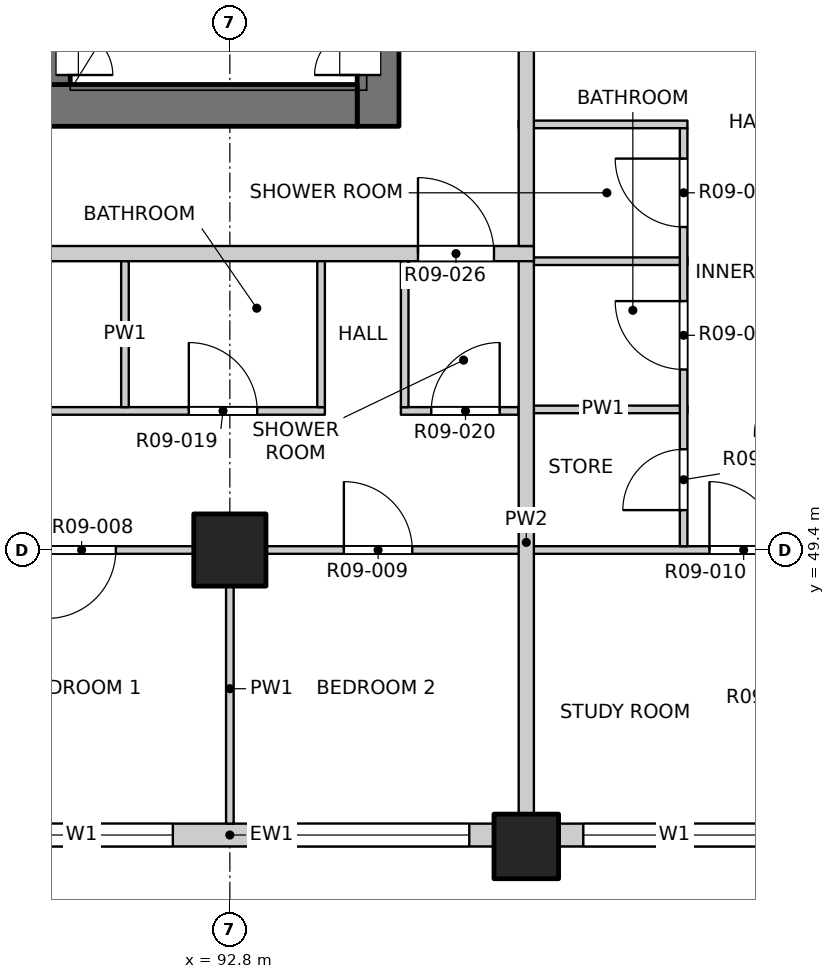
"""IFC4 building model, lengths in metres.
Left out: names, types, materials, properties, quantities, classifications, styles, units other than length and angle.
Written with IfcOpenShell. Run it as: python <this file> out.ifc"""

import sys

from ifc_helpers import new_model, si_unit, direction, frame, frame_2d, origin, origin_2d, place, context, subcontext, project, spatial, rectangle, extrude, element, fill, save


model = new_model("IFC4")
c1 = context("Model", 3, precision=1e-05, world=origin(), true_north=direction((0.0, 1.0)))
c2 = subcontext(c1, "Body", "Model", "MODEL_VIEW")
j1 = project(units=[si_unit("LENGTHUNIT", "METRE"), si_unit("PLANEANGLEUNIT", "RADIAN")], contexts=[c1])
p1 = place(None, origin())
s1 = spatial("IfcSite", under=j1, at=p1, CompositionType="ELEMENT")
p2 = place(p1, origin())
s2 = spatial("IfcBuilding", under=s1, at=p2, CompositionType="ELEMENT")
p3 = place(p2, frame((0.0, 0.0, 113.5)))
s3 = spatial("IfcBuildingStorey", under=s2, at=p3, CompositionType="ELEMENT", Elevation=113.5)
p4 = place(p3, frame((96.7, 45.5, -0.25), z_axis=(0.0, 0.0, 1.0), x_axis=(1.0, 0.0, 0.0)))
e1 = element("IfcColumn", 1, at=p4, inside=s3, PredefinedType="COLUMN", context=c2, shape_type="SweptSolid", body=[
    extrude(rectangle(XDim=0.85, YDim=0.85, at=origin_2d()), origin(), (0.0, 0.0, 1.0), 3.35),
])
p5 = place(p3, frame((92.8, 49.4, -0.25), z_axis=(0.0, 0.0, 1.0), x_axis=(1.0, 0.0, 0.0)))
e2 = element("IfcColumn", 2, at=p5, inside=s3, PredefinedType="COLUMN", context=c2, shape_type="SweptSolid", body=[
    extrude(rectangle(XDim=0.95, YDim=0.95, at=origin_2d()), origin(), (0.0, 0.0, 1.0), 3.35),
])
p6 = place(p3, frame((94.75, 54.975, -0.25), z_axis=(0.0, 0.0, 1.0), x_axis=(0.0, 1.0, 0.0)))
e3 = element("IfcWall", 3, at=p6, inside=s3, PredefinedType="SOLIDWALL", context=c2, shape_type="SweptSolid", body=[
    extrude(rectangle(XDim=6.975, YDim=0.55, at=frame_2d((3.487, 0.0))), origin(), (0.0, 0.0, 1.0), 3.35),
])
p7 = place(p6, frame((0.675, 0.0, 0.25)))
e4 = element("IfcOpeningElement", 4, at=p7, cuts=e3, PredefinedType="OPENING", context=c2, shape_type="SweptSolid", body=[
    extrude(rectangle(XDim=1.2, YDim=2.1, at=frame_2d((0.6, 1.05))), frame((0.0, 0.285, 0.0), z_axis=(0.0, -1.0, 0.0), x_axis=(1.0, 0.0, 0.0)), (0.0, 0.0, 1.0), 0.57),
])
p8 = place(p3, frame((75.525, 55.25, -0.25), z_axis=(0.0, 0.0, 1.0), x_axis=(1.0, 0.0, 0.0)))
e5 = element("IfcWall", 5, at=p8, inside=s3, PredefinedType="SOLIDWALL", context=c2, shape_type="SweptSolid", body=[
    extrude(rectangle(XDim=18.95, YDim=0.55, at=frame_2d((9.475, 0.0))), origin(), (0.0, 0.0, 1.0), 3.35),
])
p9 = place(p8, frame((8.725, 0.0, 0.25)))
e6 = element("IfcOpeningElement", 6, at=p9, cuts=e5, PredefinedType="OPENING", context=c2, shape_type="SweptSolid", body=[
    extrude(rectangle(XDim=1.5, YDim=2.1, at=frame_2d((0.75, 1.05))), frame((0.0, 0.285, 0.0), z_axis=(0.0, -1.0, 0.0), x_axis=(1.0, 0.0, 0.0)), (0.0, 0.0, 1.0), 0.57),
])
p10 = place(p3, frame((90.55, 55.525, -0.25), z_axis=(0.0, 0.0, 1.0), x_axis=(0.0, 1.0, 0.0)))
e7 = element("IfcWall", 7, at=p10, inside=s3, PredefinedType="SOLIDWALL", context=c2, shape_type="SweptSolid", body=[
    extrude(rectangle(XDim=6.425, YDim=0.3, at=frame_2d((3.212, 0.0))), origin(), (0.0, 0.0, 1.0), 3.35),
])
p11 = place(p10, frame((0.125, 0.0, 0.25)))
e8 = element("IfcOpeningElement", 8, at=p11, cuts=e7, PredefinedType="OPENING", context=c2, shape_type="SweptSolid", body=[
    extrude(rectangle(XDim=1.2, YDim=2.1, at=frame_2d((0.6, 1.05))), frame((0.0, 0.16, 0.0), z_axis=(0.0, -1.0, 0.0), x_axis=(1.0, 0.0, 0.0)), (0.0, 0.0, 1.0), 0.32),
])
p12 = place(p3, frame((89.325, 45.65, 0.0), z_axis=(0.0, 0.0, 1.0), x_axis=(1.0, 0.0, 0.0)))
e9 = element("IfcWall", 9, at=p12, inside=s3, PredefinedType="SOLIDWALL", context=c2, shape_type="SweptSolid", body=[
    extrude(rectangle(XDim=6.95, YDim=0.3, at=frame_2d((3.475, 0.0))), origin(), (0.0, 0.0, 1.0), 3.1),
])
p13 = place(p12, frame((0.325, 0.0, 0.9)))
e10 = element("IfcOpeningElement", 10, at=p13, cuts=e9, PredefinedType="OPENING", context=c2, shape_type="SweptSolid", body=[
    extrude(rectangle(XDim=2.4, YDim=1.8, at=frame_2d((1.2, 0.9))), frame((0.0, 0.16, 0.0), z_axis=(0.0, -1.0, 0.0), x_axis=(1.0, 0.0, 0.0)), (0.0, 0.0, 1.0), 0.32),
])
p14 = place(p12, frame((4.225, 0.0, 0.9)))
e11 = element("IfcOpeningElement", 11, at=p14, cuts=e9, PredefinedType="OPENING", context=c2, shape_type="SweptSolid", body=[
    extrude(rectangle(XDim=2.4, YDim=1.8, at=frame_2d((1.2, 0.9))), frame((0.0, 0.16, 0.0), z_axis=(0.0, -1.0, 0.0), x_axis=(1.0, 0.0, 0.0)), (0.0, 0.0, 1.0), 0.32),
])
p15 = place(p3, frame((97.125, 45.65, 0.0), z_axis=(0.0, 0.0, 1.0), x_axis=(1.0, 0.0, 0.0)))
e12 = element("IfcWall", 12, at=p15, inside=s3, PredefinedType="SOLIDWALL", context=c2, shape_type="SweptSolid", body=[
    extrude(rectangle(XDim=3.475, YDim=0.3, at=frame_2d((1.738, 0.0))), origin(), (0.0, 0.0, 1.0), 3.1),
])
p16 = place(p15, frame((0.325, 0.0, 0.9)))
e13 = element("IfcOpeningElement", 13, at=p16, cuts=e12, PredefinedType="OPENING", context=c2, shape_type="SweptSolid", body=[
    extrude(rectangle(XDim=2.4, YDim=1.8, at=frame_2d((1.2, 0.9))), frame((0.0, 0.16, 0.0), z_axis=(0.0, -1.0, 0.0), x_axis=(1.0, 0.0, 0.0)), (0.0, 0.0, 1.0), 0.32),
])
p17 = place(p3, frame((65.8, 49.4, 0.0), z_axis=(0.0, 0.0, 1.0), x_axis=(1.0, 0.0, 0.0)))
e14 = element("IfcWall", 14, at=p17, inside=s3, PredefinedType="PARTITIONING", context=c2, shape_type="SweptSolid", body=[
    extrude(rectangle(XDim=38.4, YDim=0.1, at=frame_2d((19.2, 0.0))), origin(), (0.0, 0.0, 1.0), 3.1),
])
p18 = place(p17, frame((4.19, 0.0, 0.0)))
e15 = element("IfcOpeningElement", 15, at=p18, cuts=e14, PredefinedType="OPENING", context=c2, shape_type="SweptSolid", body=[
    extrude(rectangle(XDim=0.9, YDim=2.1, at=frame_2d((0.45, 1.05))), frame((0.0, 0.06, 0.0), z_axis=(0.0, -1.0, 0.0), x_axis=(1.0, 0.0, 0.0)), (0.0, 0.0, 1.0), 0.12),
])
p19 = place(p17, frame((9.0, 0.0, 0.0)))
e16 = element("IfcOpeningElement", 16, at=p19, cuts=e14, PredefinedType="OPENING", context=c2, shape_type="SweptSolid", body=[
    extrude(rectangle(XDim=0.9, YDim=2.1, at=frame_2d((0.45, 1.05))), frame((0.0, 0.06, 0.0), z_axis=(0.0, -1.0, 0.0), x_axis=(1.0, 0.0, 0.0)), (0.0, 0.0, 1.0), 0.12),
])
p20 = place(p17, frame((12.9, 0.0, 0.0)))
e17 = element("IfcOpeningElement", 17, at=p20, cuts=e14, PredefinedType="OPENING", context=c2, shape_type="SweptSolid", body=[
    extrude(rectangle(XDim=0.9, YDim=2.1, at=frame_2d((0.45, 1.05))), frame((0.0, 0.06, 0.0), z_axis=(0.0, -1.0, 0.0), x_axis=(1.0, 0.0, 0.0)), (0.0, 0.0, 1.0), 0.12),
])
p21 = place(p17, frame((16.8, 0.0, 0.0)))
e18 = element("IfcOpeningElement", 18, at=p21, cuts=e14, PredefinedType="OPENING", context=c2, shape_type="SweptSolid", body=[
    extrude(rectangle(XDim=0.9, YDim=2.1, at=frame_2d((0.45, 1.05))), frame((0.0, 0.06, 0.0), z_axis=(0.0, -1.0, 0.0), x_axis=(1.0, 0.0, 0.0)), (0.0, 0.0, 1.0), 0.12),
])
p22 = place(p17, frame((20.7, 0.0, 0.0)))
e19 = element("IfcOpeningElement", 19, at=p22, cuts=e14, PredefinedType="OPENING", context=c2, shape_type="SweptSolid", body=[
    extrude(rectangle(XDim=0.9, YDim=2.1, at=frame_2d((0.45, 1.05))), frame((0.0, 0.06, 0.0), z_axis=(0.0, -1.0, 0.0), x_axis=(1.0, 0.0, 0.0)), (0.0, 0.0, 1.0), 0.12),
])
p23 = place(p17, frame((24.6, 0.0, 0.0)))
e20 = element("IfcOpeningElement", 20, at=p23, cuts=e14, PredefinedType="OPENING", context=c2, shape_type="SweptSolid", body=[
    extrude(rectangle(XDim=0.9, YDim=2.1, at=frame_2d((0.45, 1.05))), frame((0.0, 0.06, 0.0), z_axis=(0.0, -1.0, 0.0), x_axis=(1.0, 0.0, 0.0)), (0.0, 0.0, 1.0), 0.12),
])
p24 = place(p17, frame((28.5, 0.0, 0.0)))
e21 = element("IfcOpeningElement", 21, at=p24, cuts=e14, PredefinedType="OPENING", context=c2, shape_type="SweptSolid", body=[
    extrude(rectangle(XDim=0.9, YDim=2.1, at=frame_2d((0.45, 1.05))), frame((0.0, 0.06, 0.0), z_axis=(0.0, -1.0, 0.0), x_axis=(1.0, 0.0, 0.0)), (0.0, 0.0, 1.0), 0.12),
])
p25 = place(p17, frame((33.31, 0.0, 0.0)))
e22 = element("IfcOpeningElement", 22, at=p25, cuts=e14, PredefinedType="OPENING", context=c2, shape_type="SweptSolid", body=[
    extrude(rectangle(XDim=0.9, YDim=2.1, at=frame_2d((0.45, 1.05))), frame((0.0, 0.06, 0.0), z_axis=(0.0, -1.0, 0.0), x_axis=(1.0, 0.0, 0.0)), (0.0, 0.0, 1.0), 0.12),
])
p26 = place(p3, frame((83.35, 51.23, 0.0), z_axis=(0.0, 0.0, 1.0), x_axis=(1.0, 0.0, 0.0)))
e23 = element("IfcWall", 23, at=p26, inside=s3, PredefinedType="PARTITIONING", context=c2, shape_type="SweptSolid", body=[
    extrude(rectangle(XDim=10.7, YDim=0.1, at=frame_2d((5.35, 0.0))), origin(), (0.0, 0.0, 1.0), 3.1),
])
p27 = place(p26, frame((0.4, 0.0, 0.0)))
e24 = element("IfcOpeningElement", 24, at=p27, cuts=e23, PredefinedType="OPENING", context=c2, shape_type="SweptSolid", body=[
    extrude(rectangle(XDim=0.9, YDim=2.1, at=frame_2d((0.45, 1.05))), frame((0.0, 0.06, 0.0), z_axis=(0.0, -1.0, 0.0), x_axis=(1.0, 0.0, 0.0)), (0.0, 0.0, 1.0), 0.12),
])
p28 = place(p26, frame((2.7, 0.0, 0.0)))
e25 = element("IfcOpeningElement", 25, at=p28, cuts=e23, PredefinedType="OPENING", context=c2, shape_type="SweptSolid", body=[
    extrude(rectangle(XDim=0.8, YDim=2.1, at=frame_2d((0.4, 1.05))), frame((0.0, 0.06, 0.0), z_axis=(0.0, -1.0, 0.0), x_axis=(1.0, 0.0, 0.0)), (0.0, 0.0, 1.0), 0.12),
])
p29 = place(p26, frame((5.86, 0.0, 0.0)))
e26 = element("IfcOpeningElement", 26, at=p29, cuts=e23, PredefinedType="OPENING", context=c2, shape_type="SweptSolid", body=[
    extrude(rectangle(XDim=0.9, YDim=2.1, at=frame_2d((0.45, 1.05))), frame((0.0, 0.06, 0.0), z_axis=(0.0, -1.0, 0.0), x_axis=(1.0, 0.0, 0.0)), (0.0, 0.0, 1.0), 0.12),
])
p30 = place(p26, frame((8.91, 0.0, 0.0)))
e27 = element("IfcOpeningElement", 27, at=p30, cuts=e23, PredefinedType="OPENING", context=c2, shape_type="SweptSolid", body=[
    extrude(rectangle(XDim=0.9, YDim=2.1, at=frame_2d((0.45, 1.05))), frame((0.0, 0.06, 0.0), z_axis=(0.0, -1.0, 0.0), x_axis=(1.0, 0.0, 0.0)), (0.0, 0.0, 1.0), 0.12),
])
p31 = place(p3, frame((95.05, 51.23, 0.0), z_axis=(0.0, 0.0, 1.0), x_axis=(1.0, 0.0, 0.0)))
e28 = element("IfcWall", 28, at=p31, inside=s3, PredefinedType="PARTITIONING", context=c2, shape_type="SweptSolid", body=[
    extrude(rectangle(XDim=1.55, YDim=0.1, at=frame_2d((0.775, 0.0))), origin(), (0.0, 0.0, 1.0), 3.1),
])
p32 = place(p31, frame((0.4, 0.0, 0.0)))
e29 = element("IfcOpeningElement", 29, at=p32, cuts=e28, PredefinedType="OPENING", context=c2, shape_type="SweptSolid", body=[
    extrude(rectangle(XDim=0.9, YDim=2.1, at=frame_2d((0.45, 1.05))), frame((0.0, 0.06, 0.0), z_axis=(0.0, -1.0, 0.0), x_axis=(1.0, 0.0, 0.0)), (0.0, 0.0, 1.0), 0.12),
])
p33 = place(p3, frame((96.6, 51.25, 0.0), z_axis=(0.0, 0.0, 1.0), x_axis=(1.0, 0.0, 0.0)))
e30 = element("IfcWall", 30, at=p33, inside=s3, PredefinedType="PARTITIONING", context=c2, shape_type="SweptSolid", body=[
    extrude(rectangle(XDim=2.22, YDim=0.1, at=frame_2d((1.11, 0.0))), origin(), (0.0, 0.0, 1.0), 3.1),
])
p34 = place(p3, frame((96.8, 53.2, 0.0), z_axis=(0.0, 0.0, 1.0), x_axis=(1.0, 0.0, 0.0)))
e31 = element("IfcWall", 31, at=p34, inside=s3, PredefinedType="PARTITIONING", context=c2, shape_type="SweptSolid", body=[
    extrude(rectangle(XDim=2.02, YDim=0.1, at=frame_2d((1.01, 0.0))), origin(), (0.0, 0.0, 1.0), 3.1),
])
p35 = place(p3, frame((73.2, 53.3, 0.0), z_axis=(0.0, 0.0, 1.0), x_axis=(1.0, 0.0, 0.0)))
e32 = element("IfcWall", 32, at=p35, inside=s3, PredefinedType="PARTITIONING", context=c2, shape_type="SweptSolid", body=[
    extrude(rectangle(XDim=23.6, YDim=0.2, at=frame_2d((11.8, 0.0))), origin(), (0.0, 0.0, 1.0), 3.1),
])
p36 = place(p35, frame((10.375, 0.0, 0.0)))
e33 = element("IfcOpeningElement", 33, at=p36, cuts=e32, PredefinedType="OPENING", context=c2, shape_type="SweptSolid", body=[
    extrude(rectangle(XDim=1.0, YDim=2.1, at=frame_2d((0.5, 1.05))), frame((0.0, 0.11, 0.0), z_axis=(0.0, -1.0, 0.0), x_axis=(1.0, 0.0, 0.0)), (0.0, 0.0, 1.0), 0.22),
])
p37 = place(p35, frame((22.075, 0.0, 0.0)))
e34 = element("IfcOpeningElement", 34, at=p37, cuts=e32, PredefinedType="OPENING", context=c2, shape_type="SweptSolid", body=[
    extrude(rectangle(XDim=1.0, YDim=2.1, at=frame_2d((0.5, 1.05))), frame((0.0, 0.11, 0.0), z_axis=(0.0, -1.0, 0.0), x_axis=(1.0, 0.0, 0.0)), (0.0, 0.0, 1.0), 0.22),
])
p38 = place(p3, frame((96.6, 55.0, 0.0), z_axis=(0.0, 0.0, 1.0), x_axis=(1.0, 0.0, 0.0)))
e35 = element("IfcWall", 35, at=p38, inside=s3, PredefinedType="PARTITIONING", context=c2, shape_type="SweptSolid", body=[
    extrude(rectangle(XDim=2.22, YDim=0.1, at=frame_2d((1.11, 0.0))), origin(), (0.0, 0.0, 1.0), 3.1),
])
p39 = place(p3, frame((91.42, 51.28, 0.0), z_axis=(0.0, 0.0, 1.0), x_axis=(0.0, 1.0, 0.0)))
e36 = element("IfcWall", 36, at=p39, inside=s3, PredefinedType="PARTITIONING", context=c2, shape_type="SweptSolid", body=[
    extrude(rectangle(XDim=1.92, YDim=0.1, at=frame_2d((0.96, 0.0))), origin(), (0.0, 0.0, 1.0), 3.1),
])
p40 = place(p3, frame((92.8, 45.8, 0.0), z_axis=(0.0, 0.0, 1.0), x_axis=(0.0, 1.0, 0.0)))
e37 = element("IfcWall", 37, at=p40, inside=s3, PredefinedType="PARTITIONING", context=c2, shape_type="SweptSolid", body=[
    extrude(rectangle(XDim=3.55, YDim=0.1, at=frame_2d((1.775, 0.0))), origin(), (0.0, 0.0, 1.0), 3.1),
])
for number, where, z_axis, x_axis in (
    (38, (94.0, 51.28, 0.0), (0.0, 0.0, 1.0), (0.0, 1.0, 0.0)),
    (39, (95.1, 51.28, 0.0), (0.0, 0.0, 1.0), (0.0, 1.0, 0.0)),
):
    element("IfcWall", number, at=place(p3, frame(where, z_axis=z_axis, x_axis=x_axis)), inside=s3, PredefinedType="PARTITIONING", context=c2, shape_type="SweptSolid", body=[
        extrude(rectangle(XDim=1.92, YDim=0.1, at=frame_2d((0.96, 0.0))), origin(), (0.0, 0.0, 1.0), 3.1),
    ])
p41 = place(p3, frame((96.7, 45.8, 0.0), z_axis=(0.0, 0.0, 1.0), x_axis=(0.0, 1.0, 0.0)))
e40 = element("IfcWall", 40, at=p41, inside=s3, PredefinedType="PARTITIONING", context=c2, shape_type="SweptSolid", body=[
    extrude(rectangle(XDim=7.4, YDim=0.2, at=frame_2d((3.7, 0.0))), origin(), (0.0, 0.0, 1.0), 3.1),
])
p42 = place(p3, frame((96.7, 53.4, 0.0), z_axis=(0.0, 0.0, 1.0), x_axis=(0.0, 1.0, 0.0)))
e41 = element("IfcWall", 41, at=p42, inside=s3, PredefinedType="PARTITIONING", context=c2, shape_type="SweptSolid", body=[
    extrude(rectangle(XDim=30.8, YDim=0.2, at=frame_2d((15.4, 0.0))), origin(), (0.0, 0.0, 1.0), 3.1),
])
p43 = place(p42, frame((2.875, 0.0, 0.0)))
e42 = element("IfcOpeningElement", 42, at=p43, cuts=e41, PredefinedType="OPENING", context=c2, shape_type="SweptSolid", body=[
    extrude(rectangle(XDim=1.0, YDim=2.1, at=frame_2d((0.5, 1.05))), frame((0.0, 0.11, 0.0), z_axis=(0.0, -1.0, 0.0), x_axis=(1.0, 0.0, 0.0)), (0.0, 0.0, 1.0), 0.22),
])
p44 = place(p42, frame((14.775, 0.0, 0.0)))
e43 = element("IfcOpeningElement", 43, at=p44, cuts=e41, PredefinedType="OPENING", context=c2, shape_type="SweptSolid", body=[
    extrude(rectangle(XDim=1.0, YDim=2.1, at=frame_2d((0.5, 1.05))), frame((0.0, 0.11, 0.0), z_axis=(0.0, -1.0, 0.0), x_axis=(1.0, 0.0, 0.0)), (0.0, 0.0, 1.0), 0.22),
])
p45 = place(p42, frame((20.025, 0.0, 0.0)))
e44 = element("IfcOpeningElement", 44, at=p45, cuts=e41, PredefinedType="OPENING", context=c2, shape_type="SweptSolid", body=[
    extrude(rectangle(XDim=1.0, YDim=2.1, at=frame_2d((0.5, 1.05))), frame((0.0, 0.11, 0.0), z_axis=(0.0, -1.0, 0.0), x_axis=(1.0, 0.0, 0.0)), (0.0, 0.0, 1.0), 0.22),
])
p46 = place(p3, frame((98.77, 49.45, 0.0), z_axis=(0.0, 0.0, 1.0), x_axis=(0.0, 1.0, 0.0)))
e45 = element("IfcWall", 45, at=p46, inside=s3, PredefinedType="PARTITIONING", context=c2, shape_type="SweptSolid", body=[
    extrude(rectangle(XDim=5.5, YDim=0.1, at=frame_2d((2.75, 0.0))), origin(), (0.0, 0.0, 1.0), 3.1),
])
p47 = place(p46, frame((0.475, 0.0, 0.0)))
e46 = element("IfcOpeningElement", 46, at=p47, cuts=e45, PredefinedType="OPENING", context=c2, shape_type="SweptSolid", body=[
    extrude(rectangle(XDim=0.8, YDim=2.1, at=frame_2d((0.4, 1.05))), frame((0.0, 0.06, 0.0), z_axis=(0.0, -1.0, 0.0), x_axis=(1.0, 0.0, 0.0)), (0.0, 0.0, 1.0), 0.12),
])
p48 = place(p46, frame((2.325, 0.0, 0.0)))
e47 = element("IfcOpeningElement", 47, at=p48, cuts=e45, PredefinedType="OPENING", context=c2, shape_type="SweptSolid", body=[
    extrude(rectangle(XDim=0.9, YDim=2.1, at=frame_2d((0.45, 1.05))), frame((0.0, 0.06, 0.0), z_axis=(0.0, -1.0, 0.0), x_axis=(1.0, 0.0, 0.0)), (0.0, 0.0, 1.0), 0.12),
])
p49 = place(p46, frame((4.2, 0.0, 0.0)))
e48 = element("IfcOpeningElement", 48, at=p49, cuts=e45, PredefinedType="OPENING", context=c2, shape_type="SweptSolid", body=[
    extrude(rectangle(XDim=0.9, YDim=2.1, at=frame_2d((0.45, 1.05))), frame((0.0, 0.06, 0.0), z_axis=(0.0, -1.0, 0.0), x_axis=(1.0, 0.0, 0.0)), (0.0, 0.0, 1.0), 0.12),
])
p50 = place(p13, origin())
e49 = element("IfcWindow", 49, at=p50, inside=s3, PartitioningType="DOUBLE_PANEL_VERTICAL", PredefinedType="WINDOW", context=c2, shape_type="SweptSolid", body=[
    extrude(rectangle(XDim=2.4, YDim=1.8, at=frame_2d((1.2, 0.9))), frame((0.0, 0.03, 0.0), z_axis=(0.0, -1.0, 0.0), x_axis=(1.0, 0.0, 0.0)), (0.0, 0.0, 1.0), 0.06),
])
fill(e10, e49)
p51 = place(p14, origin())
e50 = element("IfcWindow", 50, at=p51, inside=s3, PartitioningType="DOUBLE_PANEL_VERTICAL", PredefinedType="WINDOW", context=c2, shape_type="SweptSolid", body=[
    extrude(rectangle(XDim=2.4, YDim=1.8, at=frame_2d((1.2, 0.9))), frame((0.0, 0.03, 0.0), z_axis=(0.0, -1.0, 0.0), x_axis=(1.0, 0.0, 0.0)), (0.0, 0.0, 1.0), 0.06),
])
fill(e11, e50)
p52 = place(p16, origin())
e51 = element("IfcWindow", 51, at=p52, inside=s3, PartitioningType="DOUBLE_PANEL_VERTICAL", PredefinedType="WINDOW", context=c2, shape_type="SweptSolid", body=[
    extrude(rectangle(XDim=2.4, YDim=1.8, at=frame_2d((1.2, 0.9))), frame((0.0, 0.03, 0.0), z_axis=(0.0, -1.0, 0.0), x_axis=(1.0, 0.0, 0.0)), (0.0, 0.0, 1.0), 0.06),
])
fill(e13, e51)
p53 = place(p23, origin())
e52 = element("IfcDoor", 52, at=p53, inside=s3, OperationType="SINGLE_SWING_RIGHT", PredefinedType="DOOR", context=c2, shape_type="SweptSolid", body=[
    extrude(rectangle(XDim=0.9, YDim=2.1, at=frame_2d((0.45, 1.05))), frame((0.0, 0.025, 0.0), z_axis=(0.0, -1.0, 0.0), x_axis=(1.0, 0.0, 0.0)), (0.0, 0.0, 1.0), 0.05),
])
fill(e20, e52)
p54 = place(p24, origin())
e53 = element("IfcDoor", 53, at=p54, inside=s3, OperationType="SINGLE_SWING_LEFT", PredefinedType="DOOR", context=c2, shape_type="SweptSolid", body=[
    extrude(rectangle(XDim=0.9, YDim=2.1, at=frame_2d((0.45, 1.05))), frame((0.0, 0.025, 0.0), z_axis=(0.0, -1.0, 0.0), x_axis=(1.0, 0.0, 0.0)), (0.0, 0.0, 1.0), 0.05),
])
fill(e21, e53)
p55 = place(p25, origin())
e54 = element("IfcDoor", 54, at=p55, inside=s3, OperationType="SINGLE_SWING_LEFT", PredefinedType="DOOR", context=c2, shape_type="SweptSolid", body=[
    extrude(rectangle(XDim=0.9, YDim=2.1, at=frame_2d((0.45, 1.05))), frame((0.0, 0.025, 0.0), z_axis=(0.0, -1.0, 0.0), x_axis=(1.0, 0.0, 0.0)), (0.0, 0.0, 1.0), 0.05),
])
fill(e22, e54)
p56 = place(p47, origin())
e55 = element("IfcDoor", 55, at=p56, inside=s3, OperationType="SINGLE_SWING_LEFT", PredefinedType="DOOR", context=c2, shape_type="SweptSolid", body=[
    extrude(rectangle(XDim=0.8, YDim=2.1, at=frame_2d((0.4, 1.05))), frame((0.0, 0.025, 0.0), z_axis=(0.0, -1.0, 0.0), x_axis=(1.0, 0.0, 0.0)), (0.0, 0.0, 1.0), 0.05),
])
fill(e46, e55)
p57 = place(p30, origin())
e56 = element("IfcDoor", 56, at=p57, inside=s3, OperationType="SINGLE_SWING_LEFT", PredefinedType="DOOR", context=c2, shape_type="SweptSolid", body=[
    extrude(rectangle(XDim=0.9, YDim=2.1, at=frame_2d((0.45, 1.05))), frame((0.0, 0.025, 0.0), z_axis=(0.0, -1.0, 0.0), x_axis=(1.0, 0.0, 0.0)), (0.0, 0.0, 1.0), 0.05),
])
fill(e27, e56)
p58 = place(p32, origin())
e57 = element("IfcDoor", 57, at=p58, inside=s3, OperationType="SINGLE_SWING_RIGHT", PredefinedType="DOOR", context=c2, shape_type="SweptSolid", body=[
    extrude(rectangle(XDim=0.9, YDim=2.1, at=frame_2d((0.45, 1.05))), frame((0.0, 0.025, 0.0), z_axis=(0.0, -1.0, 0.0), x_axis=(1.0, 0.0, 0.0)), (0.0, 0.0, 1.0), 0.05),
])
fill(e29, e57)
p59 = place(p48, origin())
e58 = element("IfcDoor", 58, at=p59, inside=s3, OperationType="SINGLE_SWING_RIGHT", PredefinedType="DOOR", context=c2, shape_type="SweptSolid", body=[
    extrude(rectangle(XDim=0.9, YDim=2.1, at=frame_2d((0.45, 1.05))), frame((0.0, 0.025, 0.0), z_axis=(0.0, -1.0, 0.0), x_axis=(1.0, 0.0, 0.0)), (0.0, 0.0, 1.0), 0.05),
])
fill(e47, e58)
p60 = place(p37, origin())
e59 = element("IfcDoor", 59, at=p60, inside=s3, OperationType="SINGLE_SWING_LEFT", PredefinedType="DOOR", context=c2, shape_type="SweptSolid", body=[
    extrude(rectangle(XDim=1.0, YDim=2.1, at=frame_2d((0.5, 1.05))), frame((0.0, 0.025, 0.0), z_axis=(0.0, -1.0, 0.0), x_axis=(1.0, 0.0, 0.0)), (0.0, 0.0, 1.0), 0.05),
])
fill(e34, e59)
p61 = place(p49, origin())
e60 = element("IfcDoor", 60, at=p61, inside=s3, OperationType="SINGLE_SWING_RIGHT", PredefinedType="DOOR", context=c2, shape_type="SweptSolid", body=[
    extrude(rectangle(XDim=0.9, YDim=2.1, at=frame_2d((0.45, 1.05))), frame((0.0, 0.025, 0.0), z_axis=(0.0, -1.0, 0.0), x_axis=(1.0, 0.0, 0.0)), (0.0, 0.0, 1.0), 0.05),
])
fill(e48, e60)
p62 = place(p11, origin())
e61 = element("IfcDoor", 61, at=p62, inside=s3, OperationType="DOUBLE_DOOR_SINGLE_SWING", PredefinedType="DOOR", context=c2, shape_type="SweptSolid", body=[
    extrude(rectangle(XDim=1.2, YDim=2.1, at=frame_2d((0.6, 1.05))), frame((0.0, -0.085, 0.0), z_axis=(0.0, -1.0, 0.0), x_axis=(1.0, 0.0, 0.0)), (0.0, 0.0, 1.0), 0.05),
])
fill(e8, e61)
p63 = place(p7, origin())
e62 = element("IfcDoor", 62, at=p63, inside=s3, OperationType="DOUBLE_DOOR_SINGLE_SWING", PredefinedType="DOOR", context=c2, shape_type="SweptSolid", body=[
    extrude(rectangle(XDim=1.2, YDim=2.1, at=frame_2d((0.6, 1.05))), frame((0.0, 0.26, 0.0), z_axis=(0.0, -1.0, 0.0), x_axis=(1.0, 0.0, 0.0)), (0.0, 0.0, 1.0), 0.05),
])
fill(e4, e62)
save(model, sys.argv[1])
